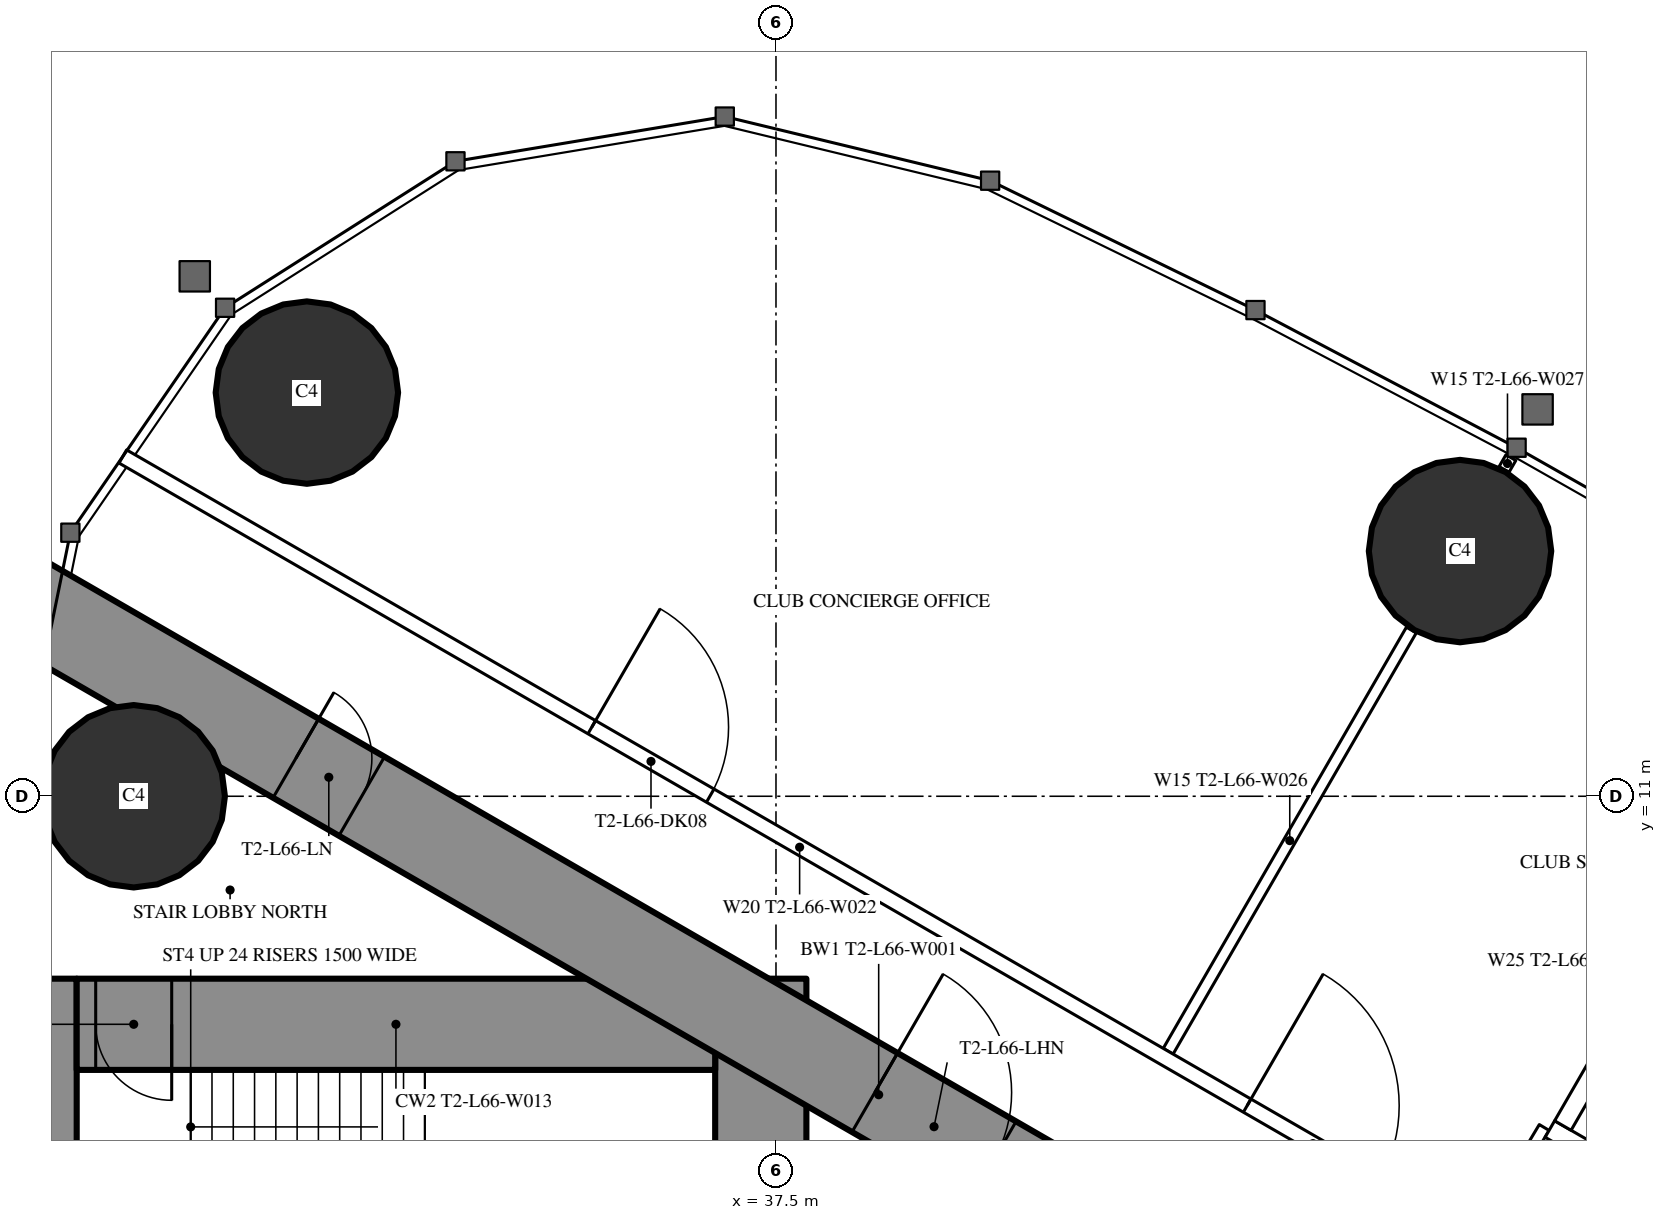
"""IFC4 building model, lengths in metres.
Left out: names, types, materials, properties, quantities, classifications, styles, units other than length and angle.
Written with IfcOpenShell. Run it as: python <this file> out.ifc"""

import sys

from ifc_helpers import new_model, si_unit, direction, frame, frame_2d, origin, origin_2d, place, context, subcontext, project, spatial, rectangle, circle, extrude, element, fill, save


model = new_model("IFC4")
c1 = context("Model", 3, precision=1e-05, world=origin(), true_north=direction((0.0, 1.0)))
c2 = subcontext(c1, "Body", "Model", "MODEL_VIEW")
j1 = project(units=[si_unit("LENGTHUNIT", "METRE"), si_unit("PLANEANGLEUNIT", "RADIAN")], contexts=[c1])
p1 = place(None, origin())
s1 = spatial("IfcSite", under=j1, at=p1, CompositionType="ELEMENT")
p2 = place(p1, origin())
s2 = spatial("IfcBuilding", under=s1, at=p2, CompositionType="ELEMENT")
p3 = place(p2, frame((0.0, 0.0, 247.7)))
s3 = spatial("IfcBuildingStorey", under=s2, at=p3, CompositionType="ELEMENT", Elevation=247.7)
for number, where, z_axis, x_axis in (
    (1, (31.328, 16.311, 0.0), (0.0, 0.0, 1.0), (1.0, 0.0, 0.0)),
    (2, (29.05, 11.0, 0.0), (0.0, 0.0, 1.0), (1.0, 0.0, 0.0)),
    (3, (46.499, 14.226, 0.0), (0.0, 0.0, 1.0), (1.0, 0.0, 0.0)),
):
    element("IfcColumn", number, at=place(p3, frame(where, z_axis=z_axis, x_axis=x_axis)), inside=s3, PredefinedType="COLUMN", context=c2, shape_type="SweptSolid", body=[
        extrude(circle(Radius=1.2, at=origin_2d()), origin(), (0.0, 0.0, 1.0), 4.2),
    ])
p4 = place(p3, frame((27.9, -8.6, 0.0), z_axis=(0.0, 0.0, 1.0), x_axis=(0.0, 1.0, 0.0)))
e4 = element("IfcWall", 4, at=p4, inside=s3, PredefinedType="SHEAR", context=c2, shape_type="SweptSolid", body=[
    extrude(rectangle(XDim=17.2, YDim=0.8, at=frame_2d((8.6, 0.0))), origin(), (0.0, 0.0, 1.0), 4.2),
])
p5 = place(p4, frame((9.35, 0.0, 0.0)))
e5 = element("IfcOpeningElement", 5, at=p5, cuts=e4, PredefinedType="OPENING", context=c2, shape_type="SweptSolid", body=[
    extrude(rectangle(XDim=0.9, YDim=2.2, at=frame_2d((0.45, 1.1))), frame((0.0, 0.41, 0.0), z_axis=(0.0, -1.0, 0.0), x_axis=(1.0, 0.0, 0.0)), (0.0, 0.0, 1.0), 0.82),
])
p6 = place(p3, frame((37.3, -8.6, 0.0), z_axis=(0.0, 0.0, 1.0), x_axis=(0.0, 1.0, 0.0)))
e6 = element("IfcWall", 6, at=p6, inside=s3, PredefinedType="SHEAR", context=c2, shape_type="SweptSolid", body=[
    extrude(rectangle(XDim=17.2, YDim=1.2, at=frame_2d((8.6, 0.0))), origin(), (0.0, 0.0, 1.0), 4.2),
])
p7 = place(p6, frame((7.7, 0.0, 0.0)))
e7 = element("IfcOpeningElement", 7, at=p7, cuts=e6, PredefinedType="OPENING", context=c2, shape_type="SweptSolid", body=[
    extrude(rectangle(XDim=1.8, YDim=2.2, at=frame_2d((0.9, 1.1))), frame((0.0, 0.61, 0.0), z_axis=(0.0, -1.0, 0.0), x_axis=(1.0, 0.0, 0.0)), (0.0, 0.0, 1.0), 1.22),
])
p8 = place(p3, frame((28.3, 8.0, 0.0), z_axis=(0.0, 0.0, 1.0), x_axis=(1.0, 0.0, 0.0)))
e8 = element("IfcWall", 8, at=p8, inside=s3, PredefinedType="SHEAR", context=c2, shape_type="SweptSolid", body=[
    extrude(rectangle(XDim=8.4, YDim=1.2, at=frame_2d((4.2, 0.0))), origin(), (0.0, 0.0, 1.0), 4.2),
])
p9 = place(p8, frame((0.25, 0.0, 0.0)))
e9 = element("IfcOpeningElement", 9, at=p9, cuts=e8, PredefinedType="OPENING", context=c2, shape_type="SweptSolid", body=[
    extrude(rectangle(XDim=1.0, YDim=2.2, at=frame_2d((0.5, 1.1))), frame((0.0, 0.61, 0.0), z_axis=(0.0, -1.0, 0.0), x_axis=(1.0, 0.0, 0.0)), (0.0, 0.0, 1.0), 1.22),
])
p10 = place(p3, frame((27.2, 13.8, 0.0), z_axis=(0.0, 0.0, 1.0), x_axis=(0.866024515034, -0.500001539357, 0.0)))
e10 = element("IfcWall", 10, at=p10, inside=s3, PredefinedType="SHEAR", context=c2, shape_type="SweptSolid", body=[
    extrude(rectangle(XDim=26.907, YDim=1.2, at=frame_2d((13.454, 0.0))), origin(), (0.0, 0.0, 1.0), 4.2),
])
p11 = place(p10, frame((4.6, 0.0, 0.0)))
e11 = element("IfcOpeningElement", 11, at=p11, cuts=e10, PredefinedType="OPENING", context=c2, shape_type="SweptSolid", body=[
    extrude(rectangle(XDim=1.0, YDim=2.2, at=frame_2d((0.5, 1.1))), frame((0.0, 0.61, 0.0), z_axis=(0.0, -1.0, 0.0), x_axis=(1.0, 0.0, 0.0)), (0.0, 0.0, 1.0), 1.22),
])
p12 = place(p10, frame((13.395, 0.0, 0.0)))
e12 = element("IfcOpeningElement", 12, at=p12, cuts=e10, PredefinedType="OPENING", context=c2, shape_type="SweptSolid", body=[
    extrude(rectangle(XDim=1.8, YDim=2.2, at=frame_2d((0.9, 1.1))), frame((0.0, 0.61, 0.0), z_axis=(0.0, -1.0, 0.0), x_axis=(1.0, 0.0, 0.0)), (0.0, 0.0, 1.0), 1.22),
])
p13 = place(p3, frame((42.66, 7.646, 0.0), z_axis=(0.0, 0.0, 1.0), x_axis=(0.499996592859, 0.866027370889, 0.0)))
e13 = element("IfcWall", 13, at=p13, inside=s3, PredefinedType="PARTITIONING", context=c2, shape_type="SweptSolid", body=[
    extrude(rectangle(XDim=6.398, YDim=0.15, at=frame_2d((3.199, 0.0))), origin(), (0.0, 0.0, 1.0), 3.05),
])
p14 = place(p3, frame((47.079, 15.3, 0.0), z_axis=(0.0, 0.0, 1.0), x_axis=(0.499212083968, 0.866479829667, 0.0)))
e14 = element("IfcWall", 14, at=p14, inside=s3, PredefinedType="PARTITIONING", context=c2, shape_type="SweptSolid", body=[
    extrude(rectangle(XDim=0.179, YDim=0.15, at=frame_2d((0.09, 0.0))), origin(), (0.0, 0.0, 1.0), 3.05),
])
p15 = place(p3, frame((28.907, 15.47, 0.0), z_axis=(0.0, 0.0, 1.0), x_axis=(0.866026627509, -0.499997880441, 0.0)))
e15 = element("IfcWall", 15, at=p15, inside=s3, PredefinedType="PARTITIONING", context=c2, shape_type="SweptSolid", body=[
    extrude(rectangle(XDim=20.563, YDim=0.2, at=frame_2d((10.282, 0.0))), origin(), (0.0, 0.0, 1.0), 3.95),
])
p16 = place(p15, frame((17.081, 0.0, 0.0)))
e16 = element("IfcOpeningElement", 16, at=p16, cuts=e15, PredefinedType="OPENING", context=c2, shape_type="SweptSolid", body=[
    extrude(rectangle(XDim=2.0, YDim=2.4, at=frame_2d((1.0, 1.2))), frame((0.0, 0.11, 0.0), z_axis=(0.0, -1.0, 0.0), x_axis=(1.0, 0.0, 0.0)), (0.0, 0.0, 1.0), 0.22),
])
p17 = place(p15, frame((7.124, 0.0, 0.0)))
e17 = element("IfcOpeningElement", 17, at=p17, cuts=e15, PredefinedType="OPENING", context=c2, shape_type="SweptSolid", body=[
    extrude(rectangle(XDim=1.8, YDim=2.2, at=frame_2d((0.9, 1.1))), frame((0.0, 0.11, 0.0), z_axis=(0.0, -1.0, 0.0), x_axis=(1.0, 0.0, 0.0)), (0.0, 0.0, 1.0), 0.22),
])
p18 = place(p3, frame((47.606, 6.642, 0.0), z_axis=(0.0, 0.0, 1.0), x_axis=(-0.51353662755, -0.858067673418, 0.0)))
e18 = element("IfcWall", 18, at=p18, inside=s3, PredefinedType="PARTITIONING", context=c2, shape_type="SweptSolid", body=[
    extrude(rectangle(XDim=1.91, YDim=0.15, at=frame_2d((0.955, 0.0))), origin(), (0.0, 0.0, 1.0), 3.95),
])
p19 = place(p3, frame((47.681, 6.622, 0.0), z_axis=(0.0, 0.0, 1.0), x_axis=(0.86603344179, -0.499986077507, 0.0)))
e19 = element("IfcWall", 19, at=p19, inside=s3, PredefinedType="PARTITIONING", context=c2, shape_type="SweptSolid", body=[
    extrude(rectangle(XDim=6.6, YDim=0.25, at=frame_2d((3.3, 0.0))), origin(), (0.0, 0.0, 1.0), 3.95),
])
p20 = place(p19, frame((0.75, 0.0, 0.0)))
e20 = element("IfcOpeningElement", 20, at=p20, cuts=e19, PredefinedType="OPENING", context=c2, shape_type="SweptSolid", body=[
    extrude(rectangle(XDim=1.1, YDim=2.2, at=frame_2d((0.55, 1.1))), frame((0.0, 0.135, 0.0), z_axis=(0.0, -1.0, 0.0), x_axis=(1.0, 0.0, 0.0)), (0.0, 0.0, 1.0), 0.27),
])
p21 = place(p19, frame((2.75, 0.0, 0.0)))
e21 = element("IfcOpeningElement", 21, at=p21, cuts=e19, PredefinedType="OPENING", context=c2, shape_type="SweptSolid", body=[
    extrude(rectangle(XDim=1.1, YDim=2.2, at=frame_2d((0.55, 1.1))), frame((0.0, 0.135, 0.0), z_axis=(0.0, -1.0, 0.0), x_axis=(1.0, 0.0, 0.0)), (0.0, 0.0, 1.0), 0.27),
])
p22 = place(p19, frame((4.75, 0.0, 0.0)))
e22 = element("IfcOpeningElement", 22, at=p22, cuts=e19, PredefinedType="OPENING", context=c2, shape_type="SweptSolid", body=[
    extrude(rectangle(XDim=1.1, YDim=2.2, at=frame_2d((0.55, 1.1))), frame((0.0, 0.135, 0.0), z_axis=(0.0, -1.0, 0.0), x_axis=(1.0, 0.0, 0.0)), (0.0, 0.0, 1.0), 0.27),
])
p23 = place(p3, frame((47.852, 6.668, 0.0), z_axis=(0.0, 0.0, 1.0), x_axis=(0.499929347863, 0.866066190972, 0.0)))
e23 = element("IfcWall", 23, at=p23, inside=s3, PredefinedType="PARTITIONING", context=c2, shape_type="SweptSolid", body=[
    extrude(rectangle(XDim=3.201, YDim=0.25, at=frame_2d((1.6, 0.0))), origin(), (0.0, 0.0, 1.0), 3.95),
])
p24 = place(p16, origin())
e24 = element("IfcDoor", 24, at=p24, inside=s3, OperationType="DOUBLE_DOOR_SINGLE_SWING", PredefinedType="DOOR", context=c2, shape_type="SweptSolid", body=[
    extrude(rectangle(XDim=2.0, YDim=2.4, at=frame_2d((1.0, 1.2))), frame((0.0, 0.025, 0.0), z_axis=(0.0, -1.0, 0.0), x_axis=(1.0, 0.0, 0.0)), (0.0, 0.0, 1.0), 0.05),
])
fill(e16, e24)
p25 = place(p17, origin())
e25 = element("IfcDoor", 25, at=p25, inside=s3, OperationType="DOUBLE_DOOR_SINGLE_SWING", PredefinedType="DOOR", context=c2, shape_type="SweptSolid", body=[
    extrude(rectangle(XDim=1.8, YDim=2.2, at=frame_2d((0.9, 1.1))), frame((0.0, 0.025, 0.0), z_axis=(0.0, -1.0, 0.0), x_axis=(1.0, 0.0, 0.0)), (0.0, 0.0, 1.0), 0.05),
])
fill(e17, e25)
p26 = place(p11, origin())
e26 = element("IfcDoor", 26, at=p26, inside=s3, OperationType="SINGLE_SWING_LEFT", PredefinedType="DOOR", context=c2, shape_type="SweptSolid", body=[
    extrude(rectangle(XDim=1.0, YDim=2.2, at=frame_2d((0.5, 1.1))), frame((0.0, 0.025, 0.0), z_axis=(0.0, -1.0, 0.0), x_axis=(1.0, 0.0, 0.0)), (0.0, 0.0, 1.0), 0.05),
])
fill(e11, e26)
p27 = place(p12, origin())
e27 = element("IfcDoor", 27, at=p27, inside=s3, OperationType="DOUBLE_DOOR_SINGLE_SWING", PredefinedType="DOOR", context=c2, shape_type="SweptSolid", body=[
    extrude(rectangle(XDim=1.8, YDim=2.2, at=frame_2d((0.9, 1.1))), frame((0.0, 0.025, 0.0), z_axis=(0.0, -1.0, 0.0), x_axis=(1.0, 0.0, 0.0)), (0.0, 0.0, 1.0), 0.05),
])
fill(e12, e27)
p28 = place(p9, origin())
e28 = element("IfcDoor", 28, at=p28, inside=s3, OperationType="SINGLE_SWING_RIGHT", PredefinedType="DOOR", context=c2, shape_type="SweptSolid", body=[
    extrude(rectangle(XDim=1.0, YDim=2.2, at=frame_2d((0.5, 1.1))), frame((0.0, 0.025, 0.0), z_axis=(0.0, -1.0, 0.0), x_axis=(1.0, 0.0, 0.0)), (0.0, 0.0, 1.0), 0.05),
])
fill(e9, e28)
save(model, sys.argv[1])
